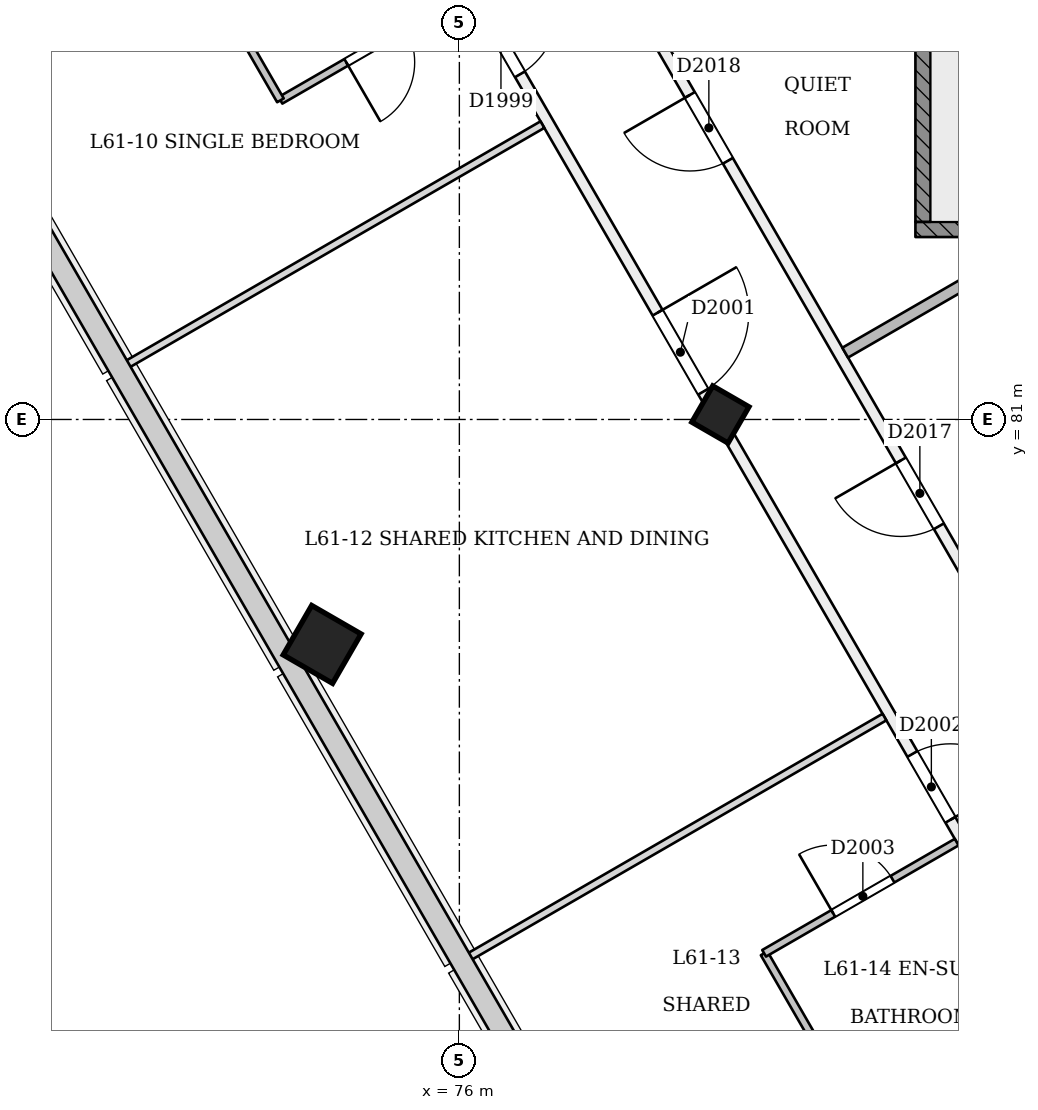
"""IFC4 building model, lengths in metres.
Left out: names, types, materials, properties, quantities, classifications, styles, units other than length and angle.
Written with IfcOpenShell. Run it as: python <this file> out.ifc"""

import sys

from ifc_helpers import new_model, si_unit, direction, frame, frame_2d, origin, origin_2d, place, context, subcontext, project, spatial, rectangle, extrude, element, fill, save


model = new_model("IFC4")
c1 = context("Model", 3, precision=1e-05, world=origin(), true_north=direction((0.0, 1.0)))
c2 = subcontext(c1, "Body", "Model", "MODEL_VIEW")
j1 = project(units=[si_unit("LENGTHUNIT", "METRE"), si_unit("PLANEANGLEUNIT", "RADIAN")], contexts=[c1])
p1 = place(None, origin())
s1 = spatial("IfcSite", under=j1, at=p1, CompositionType="ELEMENT")
p2 = place(p1, origin())
s2 = spatial("IfcBuilding", under=s1, at=p2, CompositionType="ELEMENT")
p3 = place(p2, frame((0.0, 0.0, 239.2)))
s3 = spatial("IfcBuildingStorey", under=s2, at=p3, CompositionType="ELEMENT", Elevation=239.2)
p4 = place(p3, frame((79.407, 81.019, -0.017), z_axis=(0.022222910879, 0.038415824599, 0.999014697916), x_axis=(-0.866025559342, -0.498520326662, 0.038434547893)))
e1 = element("IfcColumn", 1, at=p4, inside=s3, PredefinedType="COLUMN", context=c2, shape_type="SweptSolid", body=[
    extrude(rectangle(XDim=0.55, YDim=0.55, at=origin_2d()), origin(), (0.0, 0.0, 1.0), 3.604),
])
p5 = place(p3, frame((74.168, 77.994, -0.023), z_axis=(0.02215369191, 0.038413282303, 0.999016333038), x_axis=(-0.86536622594, -0.499666419476, 0.038402659414)))
e2 = element("IfcColumn", 2, at=p5, inside=s3, PredefinedType="COLUMN", context=c2, shape_type="SweptSolid", body=[
    extrude(rectangle(XDim=0.75, YDim=0.75, at=origin_2d()), origin(), (0.0, 0.0, 1.0), 3.604),
])
p6 = place(p3, frame((85.0, 74.933, 0.0), z_axis=(0.0, 0.0, 1.0), x_axis=(-0.500002819098, 0.866023776171, 0.0)))
e3 = element("IfcWall", 3, at=p6, inside=s3, PredefinedType="PARTITIONING", context=c2, shape_type="SweptSolid", body=[
    extrude(rectangle(XDim=18.091, YDim=0.15, at=frame_2d((9.045, 0.0))), origin(), (0.0, 0.0, 1.0), 3.2),
])
p7 = place(p6, frame((15.01, 0.0, 0.0)))
e4 = element("IfcOpeningElement", 4, at=p7, cuts=e3, PredefinedType="OPENING", context=c2, shape_type="SweptSolid", body=[
    extrude(rectangle(XDim=0.9, YDim=2.1, at=frame_2d((0.45, 1.05))), frame((0.0, 0.085, 0.0), z_axis=(0.0, -1.0, 0.0), x_axis=(1.0, 0.0, 0.0)), (0.0, 0.0, 1.0), 0.171),
])
p8 = place(p6, frame((2.21, 0.0, 0.0)))
e5 = element("IfcOpeningElement", 5, at=p8, cuts=e3, PredefinedType="OPENING", context=c2, shape_type="SweptSolid", body=[
    extrude(rectangle(XDim=0.9, YDim=2.1, at=frame_2d((0.45, 1.05))), frame((0.0, 0.085, 0.0), z_axis=(0.0, -1.0, 0.0), x_axis=(1.0, 0.0, 0.0)), (0.0, 0.0, 1.0), 0.171),
])
p9 = place(p6, frame((5.383, 0.0, 0.0)))
e6 = element("IfcOpeningElement", 6, at=p9, cuts=e3, PredefinedType="OPENING", context=c2, shape_type="SweptSolid", body=[
    extrude(rectangle(XDim=1.0, YDim=2.1, at=frame_2d((0.5, 1.05))), frame((0.0, 0.085, 0.0), z_axis=(0.0, -1.0, 0.0), x_axis=(1.0, 0.0, 0.0)), (0.0, 0.0, 1.0), 0.171),
])
p10 = place(p6, frame((10.935, 0.0, 0.0)))
e7 = element("IfcOpeningElement", 7, at=p10, cuts=e3, PredefinedType="OPENING", context=c2, shape_type="SweptSolid", body=[
    extrude(rectangle(XDim=1.0, YDim=2.1, at=frame_2d((0.5, 1.05))), frame((0.0, 0.085, 0.0), z_axis=(0.0, -1.0, 0.0), x_axis=(1.0, 0.0, 0.0)), (0.0, 0.0, 1.0), 0.171),
])
p11 = place(p3, frame((73.876, 90.6, 0.0), z_axis=(0.0, 0.0, 1.0), x_axis=(0.499998592047, -0.866026216665, 0.0)))
e8 = element("IfcWall", 8, at=p11, inside=s3, PredefinedType="PARTITIONING", context=c2, shape_type="SweptSolid", body=[
    extrude(rectangle(XDim=22.118, YDim=0.15, at=frame_2d((11.059, 0.0))), origin(), (0.0, 0.0, 1.0), 2.8),
])
p12 = place(p11, frame((0.28, 0.0, 0.0)))
e9 = element("IfcOpeningElement", 9, at=p12, cuts=e8, PredefinedType="OPENING", context=c2, shape_type="SweptSolid", body=[
    extrude(rectangle(XDim=1.0, YDim=2.1, at=frame_2d((0.5, 1.05))), frame((0.0, 0.085, 0.0), z_axis=(0.0, -1.0, 0.0), x_axis=(1.0, 0.0, 0.0)), (0.0, 0.0, 1.0), 0.171),
])
p13 = place(p11, frame((4.842, 0.0, 0.0)))
e10 = element("IfcOpeningElement", 10, at=p13, cuts=e8, PredefinedType="OPENING", context=c2, shape_type="SweptSolid", body=[
    extrude(rectangle(XDim=1.0, YDim=2.1, at=frame_2d((0.5, 1.05))), frame((0.0, 0.085, 0.0), z_axis=(0.0, -1.0, 0.0), x_axis=(1.0, 0.0, 0.0)), (0.0, 0.0, 1.0), 0.171),
])
p14 = place(p11, frame((9.463, 0.0, 0.0)))
e11 = element("IfcOpeningElement", 11, at=p14, cuts=e8, PredefinedType="OPENING", context=c2, shape_type="SweptSolid", body=[
    extrude(rectangle(XDim=1.2, YDim=2.1, at=frame_2d((0.6, 1.05))), frame((0.0, 0.085, 0.0), z_axis=(0.0, -1.0, 0.0), x_axis=(1.0, 0.0, 0.0)), (0.0, 0.0, 1.0), 0.171),
])
p15 = place(p11, frame((16.167, 0.0, 0.0)))
e12 = element("IfcOpeningElement", 12, at=p15, cuts=e8, PredefinedType="OPENING", context=c2, shape_type="SweptSolid", body=[
    extrude(rectangle(XDim=1.0, YDim=2.1, at=frame_2d((0.5, 1.05))), frame((0.0, 0.085, 0.0), z_axis=(0.0, -1.0, 0.0), x_axis=(1.0, 0.0, 0.0)), (0.0, 0.0, 1.0), 0.171),
])
p16 = place(p11, frame((20.376, 0.0, 0.0)))
e13 = element("IfcOpeningElement", 13, at=p16, cuts=e8, PredefinedType="OPENING", context=c2, shape_type="SweptSolid", body=[
    extrude(rectangle(XDim=1.2, YDim=2.1, at=frame_2d((0.6, 1.05))), frame((0.0, 0.085, 0.0), z_axis=(0.0, -1.0, 0.0), x_axis=(1.0, 0.0, 0.0)), (0.0, 0.0, 1.0), 0.171),
])
p17 = place(p3, frame((69.365, 85.614, 0.0), z_axis=(0.0, 0.0, 1.0), x_axis=(0.866019471182, 0.500010275428, 0.0)))
e14 = element("IfcWall", 14, at=p17, inside=s3, PredefinedType="PARTITIONING", context=c2, shape_type="SweptSolid", body=[
    extrude(rectangle(XDim=3.5, YDim=0.15, at=frame_2d((1.75, 0.0))), origin(), (0.0, 0.0, 1.0), 2.7),
])
p18 = place(p3, frame((76.093, 86.611, 0.0), z_axis=(0.0, 0.0, 1.0), x_axis=(-0.866011447264, -0.500024172624, 0.0)))
e15 = element("IfcWall", 15, at=p18, inside=s3, PredefinedType="PARTITIONING", context=c2, shape_type="SweptSolid", body=[
    extrude(rectangle(XDim=2.825, YDim=0.1, at=frame_2d((1.413, 0.0))), origin(), (0.0, 0.0, 1.0), 3.2),
])
p19 = place(p18, frame((0.925, 0.0, 0.0)))
e16 = element("IfcOpeningElement", 16, at=p19, cuts=e15, PredefinedType="OPENING", context=c2, shape_type="SweptSolid", body=[
    extrude(rectangle(XDim=0.9, YDim=2.1, at=frame_2d((0.45, 1.05))), frame((0.0, 0.061, 0.0), z_axis=(0.0, -1.0, 0.0), x_axis=(1.0, 0.0, 0.0)), (0.0, 0.0, 1.0), 0.121),
])
p20 = place(p3, frame((73.646, 85.198, 0.0), z_axis=(0.0, 0.0, 1.0), x_axis=(-0.500004234368, 0.866022959057, 0.0)))
e17 = element("IfcWall", 17, at=p20, inside=s3, PredefinedType="PARTITIONING", context=c2, shape_type="SweptSolid", body=[
    extrude(rectangle(XDim=2.5, YDim=0.1, at=frame_2d((1.25, 0.0))), origin(), (0.0, 0.0, 1.0), 2.8),
])
for number, where, z_axis, x_axis in (
    (18, (71.597, 81.706, 0.0), (0.0, 0.0, 1.0), (0.866, 0.5, 0.0)),
    (19, (76.097, 73.912, 0.0), (0.0, 0.0, 1.0), (0.866, 0.5, 0.0)),
):
    element("IfcWall", number, at=place(p3, frame(where, z_axis=z_axis, x_axis=x_axis)), inside=s3, PredefinedType="PARTITIONING", context=c2, shape_type="SweptSolid", body=[
        extrude(rectangle(XDim=6.345, YDim=0.1, at=frame_2d((3.173, 0.0))), origin(), (0.0, 0.0, 1.0), 2.7),
    ])
p21 = place(p3, frame((81.272, 71.79, 0.0), z_axis=(0.0, 0.0, 1.0), x_axis=(-0.499976333282, 0.866039067339, 0.0)))
e20 = element("IfcWall", 20, at=p21, inside=s3, PredefinedType="PARTITIONING", context=c2, shape_type="SweptSolid", body=[
    extrude(rectangle(XDim=2.525, YDim=0.1, at=frame_2d((1.262, 0.0))), origin(), (0.0, 0.0, 1.0), 3.2),
])
p22 = place(p3, frame((80.01, 73.977, 0.0), z_axis=(0.0, 0.0, 1.0), x_axis=(0.86601045545, 0.500025890382, 0.0)))
e21 = element("IfcWall", 21, at=p22, inside=s3, PredefinedType="PARTITIONING", context=c2, shape_type="SweptSolid", body=[
    extrude(rectangle(XDim=2.925, YDim=0.1, at=frame_2d((1.462, 0.0))), origin(), (0.0, 0.0, 1.0), 3.2),
])
p23 = place(p22, frame((1.05, 0.0, 0.0)))
e22 = element("IfcOpeningElement", 22, at=p23, cuts=e21, PredefinedType="OPENING", context=c2, shape_type="SweptSolid", body=[
    extrude(rectangle(XDim=0.9, YDim=2.1, at=frame_2d((0.45, 1.05))), frame((0.0, 0.061, 0.0), z_axis=(0.0, -1.0, 0.0), x_axis=(1.0, 0.0, 0.0)), (0.0, 0.0, 1.0), 0.121),
])
p24 = place(p3, frame((81.327, 71.735, 0.0), z_axis=(0.0, 0.0, 1.0), x_axis=(0.865989634427, 0.500061949227, 0.0)))
e23 = element("IfcWall", 23, at=p24, inside=s3, PredefinedType="PARTITIONING", context=c2, shape_type="SweptSolid", body=[
    extrude(rectangle(XDim=2.905, YDim=0.1, at=frame_2d((1.453, 0.0))), origin(), (0.0, 0.0, 1.0), 3.2),
])
p25 = place(p3, frame((83.71, 83.4, 0.0), z_axis=(0.0, 0.0, 1.0), x_axis=(-0.866046583016, -0.4999633147, 0.0)))
e24 = element("IfcWall", 24, at=p25, inside=s3, PredefinedType="PARTITIONING", context=c2, shape_type="SweptSolid", body=[
    extrude(rectangle(XDim=3.042, YDim=0.15, at=frame_2d((1.521, 0.0))), origin(), (0.0, 0.0, 1.0), 3.2),
])
p26 = place(p3, frame((82.0, 83.5, 0.0), z_axis=(0.0, 0.0, 1.0), x_axis=(1.0, 0.0, 0.0)))
e25 = element("IfcWall", 25, at=p26, inside=s3, PredefinedType="SOLIDWALL", context=c2, shape_type="SweptSolid", body=[
    extrude(rectangle(XDim=6.0, YDim=0.2, at=frame_2d((3.0, 0.0))), origin(), (0.0, 0.0, 1.0), 3.2),
])
p27 = place(p3, frame((82.1, 83.6, 0.0), z_axis=(0.0, 0.0, 1.0), x_axis=(0.0, 1.0, 0.0)))
e26 = element("IfcWall", 26, at=p27, inside=s3, PredefinedType="SOLIDWALL", context=c2, shape_type="SweptSolid", body=[
    extrude(rectangle(XDim=6.8, YDim=0.2, at=frame_2d((3.4, 0.0))), origin(), (0.0, 0.0, 1.0), 3.2),
])
p28 = place(p13, origin())
e27 = element("IfcDoor", 27, at=p28, inside=s3, OperationType="SINGLE_SWING_LEFT", PredefinedType="NOTDEFINED", context=c2, shape_type="SweptSolid", body=[
    extrude(rectangle(XDim=1.0, YDim=2.1, at=frame_2d((0.5, 1.05))), frame((0.0, 0.025, 0.0), z_axis=(0.0, -1.0, 0.0), x_axis=(1.0, 0.0, 0.0)), (0.0, 0.0, 1.0), 0.05),
])
fill(e10, e27)
p29 = place(p19, origin())
e28 = element("IfcDoor", 28, at=p29, inside=s3, OperationType="SINGLE_SWING_RIGHT", PredefinedType="NOTDEFINED", context=c2, shape_type="SweptSolid", body=[
    extrude(rectangle(XDim=0.9, YDim=2.1, at=frame_2d((0.45, 1.05))), frame((0.0, 0.025, 0.0), z_axis=(0.0, -1.0, 0.0), x_axis=(1.0, 0.0, 0.0)), (0.0, 0.0, 1.0), 0.05),
])
fill(e16, e28)
p30 = place(p14, origin())
e29 = element("IfcDoor", 29, at=p30, inside=s3, OperationType="SINGLE_SWING_LEFT", PredefinedType="NOTDEFINED", context=c2, shape_type="SweptSolid", body=[
    extrude(rectangle(XDim=1.2, YDim=2.1, at=frame_2d((0.6, 1.05))), frame((0.0, 0.025, 0.0), z_axis=(0.0, -1.0, 0.0), x_axis=(1.0, 0.0, 0.0)), (0.0, 0.0, 1.0), 0.05),
])
fill(e11, e29)
p31 = place(p15, origin())
e30 = element("IfcDoor", 30, at=p31, inside=s3, OperationType="SINGLE_SWING_RIGHT", PredefinedType="NOTDEFINED", context=c2, shape_type="SweptSolid", body=[
    extrude(rectangle(XDim=1.0, YDim=2.1, at=frame_2d((0.5, 1.05))), frame((0.0, 0.025, 0.0), z_axis=(0.0, -1.0, 0.0), x_axis=(1.0, 0.0, 0.0)), (0.0, 0.0, 1.0), 0.05),
])
fill(e12, e30)
p32 = place(p23, origin())
e31 = element("IfcDoor", 31, at=p32, inside=s3, OperationType="SINGLE_SWING_LEFT", PredefinedType="NOTDEFINED", context=c2, shape_type="SweptSolid", body=[
    extrude(rectangle(XDim=0.9, YDim=2.1, at=frame_2d((0.45, 1.05))), frame((0.0, 0.025, 0.0), z_axis=(0.0, -1.0, 0.0), x_axis=(1.0, 0.0, 0.0)), (0.0, 0.0, 1.0), 0.05),
])
fill(e22, e31)
p33 = place(p9, origin())
e32 = element("IfcDoor", 32, at=p33, inside=s3, OperationType="SINGLE_SWING_RIGHT", PredefinedType="NOTDEFINED", context=c2, shape_type="SweptSolid", body=[
    extrude(rectangle(XDim=1.0, YDim=2.1, at=frame_2d((0.5, 1.05))), frame((0.0, 0.025, 0.0), z_axis=(0.0, -1.0, 0.0), x_axis=(1.0, 0.0, 0.0)), (0.0, 0.0, 1.0), 0.05),
])
fill(e6, e32)
p34 = place(p10, origin())
e33 = element("IfcDoor", 33, at=p34, inside=s3, OperationType="SINGLE_SWING_RIGHT", PredefinedType="NOTDEFINED", context=c2, shape_type="SweptSolid", body=[
    extrude(rectangle(XDim=1.0, YDim=2.1, at=frame_2d((0.5, 1.05))), frame((0.0, 0.025, 0.0), z_axis=(0.0, -1.0, 0.0), x_axis=(1.0, 0.0, 0.0)), (0.0, 0.0, 1.0), 0.05),
])
fill(e7, e33)
save(model, sys.argv[1])
